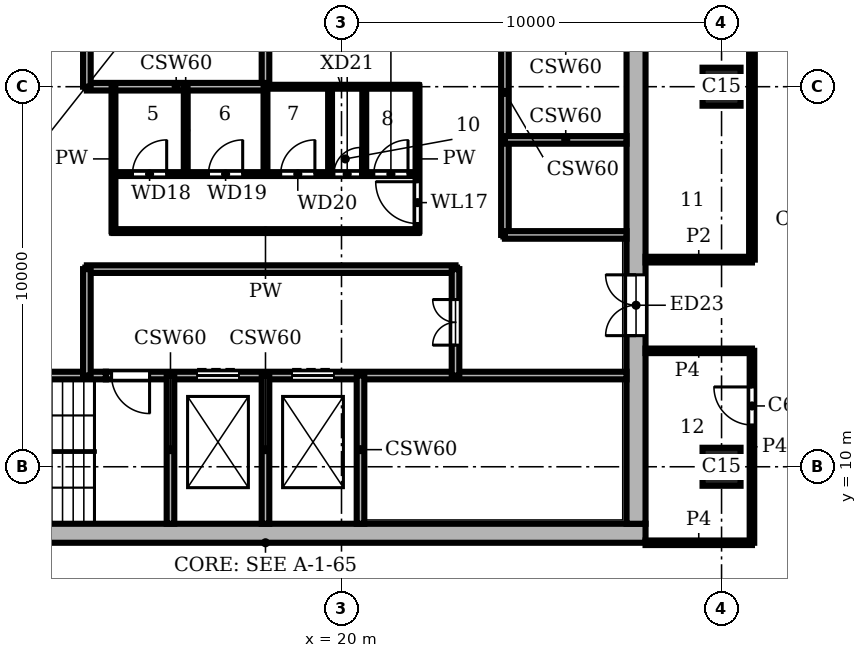
"""IFC4 building model, lengths in metres.
Left out: names, types, materials, properties, quantities, classifications, styles, units other than length and angle.
Written with IfcOpenShell. Run it as: python <this file> out.ifc"""

import sys

from ifc_helpers import new_model, si_unit, direction, frame, frame_2d, origin, origin_2d, place, context, subcontext, project, spatial, rectangle, extrude, element, fill, save


model = new_model("IFC4")
c1 = context("Model", 3, precision=1e-05, world=origin(), true_north=direction((0.0, 1.0)))
c2 = subcontext(c1, "Body", "Model", "MODEL_VIEW")
j1 = project(units=[si_unit("LENGTHUNIT", "METRE"), si_unit("PLANEANGLEUNIT", "RADIAN")], contexts=[c1])
p1 = place(None, origin())
s1 = spatial("IfcSite", under=j1, at=p1, CompositionType="ELEMENT")
p2 = place(p1, origin())
s2 = spatial("IfcBuilding", under=s1, at=p2, CompositionType="ELEMENT")
p3 = place(p2, frame((0.0, 0.0, 294.3)))
s3 = spatial("IfcBuildingStorey", under=s2, at=p3, CompositionType="ELEMENT", Elevation=294.3)
for number, where, z_axis, x_axis in (
    (1, (30.0, 10.0, 0.0), (0.0, 0.0, 1.0), (1.0, 0.0, 0.0)),
    (2, (30.0, 20.0, 0.0), (0.0, 0.0, 1.0), (1.0, 0.0, 0.0)),
):
    element("IfcColumn", number, at=place(p3, frame(where, z_axis=z_axis, x_axis=x_axis)), inside=s3, PredefinedType="COLUMN", context=c2, shape_type="SweptSolid", body=[
        extrude(rectangle(XDim=1.0, YDim=1.0, at=origin_2d()), origin(), (0.0, 0.0, 1.0), 3.9),
    ])
p4 = place(p3, frame((8.0, 8.25, 0.0), z_axis=(0.0, 0.0, 1.0), x_axis=(1.0, 0.0, 0.0)))
e3 = element("IfcWall", 3, at=p4, inside=s3, PredefinedType="SHEAR", context=c2, shape_type="SweptSolid", body=[
    extrude(rectangle(XDim=20.0, YDim=0.5, at=frame_2d((10.0, 0.0))), origin(), (0.0, 0.0, 1.0), 3.9),
])
p5 = place(p3, frame((27.75, 8.5, 0.0), z_axis=(0.0, 0.0, 1.0), x_axis=(0.0, 1.0, 0.0)))
e4 = element("IfcWall", 4, at=p5, inside=s3, PredefinedType="SHEAR", context=c2, shape_type="SweptSolid", body=[
    extrude(rectangle(XDim=19.0, YDim=0.5, at=frame_2d((9.5, 0.0))), origin(), (0.0, 0.0, 1.0), 3.9),
])
p6 = place(p5, frame((4.95, 0.0, 0.0)))
e5 = element("IfcOpeningElement", 5, at=p6, cuts=e4, PredefinedType="OPENING", context=c2, shape_type="SweptSolid", body=[
    extrude(rectangle(XDim=1.6, YDim=2.1, at=frame_2d((0.8, 1.05))), frame((0.0, 0.26, 0.0), z_axis=(0.0, -1.0, 0.0), x_axis=(1.0, 0.0, 0.0)), (0.0, 0.0, 1.0), 0.52),
])
p7 = place(p3, frame((8.5, 12.4, 0.0), z_axis=(0.0, 0.0, 1.0), x_axis=(1.0, 0.0, 0.0)))
e6 = element("IfcWall", 6, at=p7, inside=s3, PredefinedType="SHEAR", context=c2, shape_type="SweptSolid", body=[
    extrude(rectangle(XDim=5.3, YDim=0.2, at=frame_2d((2.65, 0.0))), origin(), (0.0, 0.0, 1.0), 3.58),
])
p8 = place(p3, frame((13.8, 12.4, 0.0), z_axis=(0.0, 0.0, 1.0), x_axis=(1.0, 0.0, 0.0)))
e7 = element("IfcWall", 7, at=p8, inside=s3, PredefinedType="SHEAR", context=c2, shape_type="SweptSolid", body=[
    extrude(rectangle(XDim=13.7, YDim=0.2, at=frame_2d((6.85, 0.0))), origin(), (0.0, 0.0, 1.0), 3.58),
])
p9 = place(p8, frame((2.4, 0.0, 0.0)))
e8 = element("IfcOpeningElement", 8, at=p9, cuts=e7, PredefinedType="OPENING", context=c2, shape_type="SweptSolid", body=[
    extrude(rectangle(XDim=1.1, YDim=2.1, at=frame_2d((0.55, 1.05))), frame((0.0, 0.11, 0.0), z_axis=(0.0, -1.0, 0.0), x_axis=(1.0, 0.0, 0.0)), (0.0, 0.0, 1.0), 0.22),
])
p10 = place(p8, frame((4.9, 0.0, 0.0)))
e9 = element("IfcOpeningElement", 9, at=p10, cuts=e7, PredefinedType="OPENING", context=c2, shape_type="SweptSolid", body=[
    extrude(rectangle(XDim=1.1, YDim=2.1, at=frame_2d((0.55, 1.05))), frame((0.0, 0.11, 0.0), z_axis=(0.0, -1.0, 0.0), x_axis=(1.0, 0.0, 0.0)), (0.0, 0.0, 1.0), 0.22),
])
p11 = place(p8, frame((0.15, 0.0, 0.0)))
e10 = element("IfcOpeningElement", 10, at=p11, cuts=e7, PredefinedType="OPENING", context=c2, shape_type="SweptSolid", body=[
    extrude(rectangle(XDim=1.0, YDim=2.1, at=frame_2d((0.5, 1.05))), frame((0.0, 0.11, 0.0), z_axis=(0.0, -1.0, 0.0), x_axis=(1.0, 0.0, 0.0)), (0.0, 0.0, 1.0), 0.22),
])
p12 = place(p3, frame((13.3, 15.2, 0.0), z_axis=(0.0, 0.0, 1.0), x_axis=(1.0, 0.0, 0.0)))
e11 = element("IfcWall", 11, at=p12, inside=s3, PredefinedType="SHEAR", context=c2, shape_type="SweptSolid", body=[
    extrude(rectangle(XDim=9.7, YDim=0.2, at=frame_2d((4.85, 0.0))), origin(), (0.0, 0.0, 1.0), 3.58),
])
p13 = place(p3, frame((24.3, 16.1, 0.0), z_axis=(0.0, 0.0, 1.0), x_axis=(1.0, 0.0, 0.0)))
e12 = element("IfcWall", 12, at=p13, inside=s3, PredefinedType="SHEAR", context=c2, shape_type="SweptSolid", body=[
    extrude(rectangle(XDim=3.2, YDim=0.2, at=frame_2d((1.6, 0.0))), origin(), (0.0, 0.0, 1.0), 3.58),
])
p14 = place(p3, frame((14.0, 16.2, 0.0), z_axis=(0.0, 0.0, 1.0), x_axis=(1.0, 0.0, 0.0)))
e13 = element("IfcWall", 13, at=p14, inside=s3, PredefinedType="PARTITIONING", context=c2, shape_type="SweptSolid", body=[
    extrude(rectangle(XDim=8.0, YDim=0.1, at=frame_2d((4.0, 0.0))), origin(), (0.0, 0.0, 1.0), 3.58),
])
p15 = place(p3, frame((14.0, 17.7, 0.0), z_axis=(0.0, 0.0, 1.0), x_axis=(1.0, 0.0, 0.0)))
e14 = element("IfcWall", 14, at=p15, inside=s3, PredefinedType="PARTITIONING", context=c2, shape_type="SweptSolid", body=[
    extrude(rectangle(XDim=8.0, YDim=0.1, at=frame_2d((4.0, 0.0))), origin(), (0.0, 0.0, 1.0), 3.58),
])
p16 = place(p15, frame((0.5, 0.0, 0.0)))
e15 = element("IfcOpeningElement", 15, at=p16, cuts=e14, PredefinedType="OPENING", context=c2, shape_type="SweptSolid", body=[
    extrude(rectangle(XDim=0.9, YDim=2.1, at=frame_2d((0.45, 1.05))), frame((0.0, 0.06, 0.0), z_axis=(0.0, -1.0, 0.0), x_axis=(1.0, 0.0, 0.0)), (0.0, 0.0, 1.0), 0.12),
])
p17 = place(p15, frame((2.5, 0.0, 0.0)))
e16 = element("IfcOpeningElement", 16, at=p17, cuts=e14, PredefinedType="OPENING", context=c2, shape_type="SweptSolid", body=[
    extrude(rectangle(XDim=0.9, YDim=2.1, at=frame_2d((0.45, 1.05))), frame((0.0, 0.06, 0.0), z_axis=(0.0, -1.0, 0.0), x_axis=(1.0, 0.0, 0.0)), (0.0, 0.0, 1.0), 0.12),
])
p18 = place(p15, frame((4.4, 0.0, 0.0)))
e17 = element("IfcOpeningElement", 17, at=p18, cuts=e14, PredefinedType="OPENING", context=c2, shape_type="SweptSolid", body=[
    extrude(rectangle(XDim=0.9, YDim=2.1, at=frame_2d((0.45, 1.05))), frame((0.0, 0.06, 0.0), z_axis=(0.0, -1.0, 0.0), x_axis=(1.0, 0.0, 0.0)), (0.0, 0.0, 1.0), 0.12),
])
p19 = place(p15, frame((5.8, 0.0, 0.0)))
e18 = element("IfcOpeningElement", 18, at=p19, cuts=e14, PredefinedType="OPENING", context=c2, shape_type="SweptSolid", body=[
    extrude(rectangle(XDim=0.7, YDim=2.1, at=frame_2d((0.35, 1.05))), frame((0.0, 0.06, 0.0), z_axis=(0.0, -1.0, 0.0), x_axis=(1.0, 0.0, 0.0)), (0.0, 0.0, 1.0), 0.12),
])
p20 = place(p15, frame((6.85, 0.0, 0.0)))
e19 = element("IfcOpeningElement", 19, at=p20, cuts=e14, PredefinedType="OPENING", context=c2, shape_type="SweptSolid", body=[
    extrude(rectangle(XDim=0.9, YDim=2.1, at=frame_2d((0.45, 1.05))), frame((0.0, 0.06, 0.0), z_axis=(0.0, -1.0, 0.0), x_axis=(1.0, 0.0, 0.0)), (0.0, 0.0, 1.0), 0.12),
])
p21 = place(p3, frame((24.3, 18.6, 0.0), z_axis=(0.0, 0.0, 1.0), x_axis=(1.0, 0.0, 0.0)))
e20 = element("IfcWall", 20, at=p21, inside=s3, PredefinedType="SHEAR", context=c2, shape_type="SweptSolid", body=[
    extrude(rectangle(XDim=3.2, YDim=0.2, at=frame_2d((1.6, 0.0))), origin(), (0.0, 0.0, 1.0), 3.58),
])
p22 = place(p3, frame((18.0, 20.0, 0.0), z_axis=(0.0, 0.0, 1.0), x_axis=(1.0, 0.0, 0.0)))
e21 = element("IfcWall", 21, at=p22, inside=s3, PredefinedType="PARTITIONING", context=c2, shape_type="SweptSolid", body=[
    extrude(rectangle(XDim=4.0, YDim=0.1, at=frame_2d((2.0, 0.0))), origin(), (0.0, 0.0, 1.0), 3.58),
])
p23 = place(p3, frame((13.3, 20.0, 0.0), z_axis=(0.0, 0.0, 1.0), x_axis=(1.0, 0.0, 0.0)))
e22 = element("IfcWall", 22, at=p23, inside=s3, PredefinedType="SHEAR", context=c2, shape_type="SweptSolid", body=[
    extrude(rectangle(XDim=4.7, YDim=0.2, at=frame_2d((2.35, 0.0))), origin(), (0.0, 0.0, 1.0), 3.58),
])
p24 = place(p3, frame((13.3, 12.4, 0.0), z_axis=(0.0, 0.0, 1.0), x_axis=(0.0, 1.0, 0.0)))
e23 = element("IfcWall", 23, at=p24, inside=s3, PredefinedType="SHEAR", context=c2, shape_type="SweptSolid", body=[
    extrude(rectangle(XDim=2.8, YDim=0.2, at=frame_2d((1.4, 0.0))), origin(), (0.0, 0.0, 1.0), 3.58),
])
p25 = place(p3, frame((13.3, 20.0, 0.0), z_axis=(0.0, 0.0, 1.0), x_axis=(0.0, 1.0, 0.0)))
e24 = element("IfcWall", 24, at=p25, inside=s3, PredefinedType="SHEAR", context=c2, shape_type="SweptSolid", body=[
    extrude(rectangle(XDim=3.6, YDim=0.2, at=frame_2d((1.8, 0.0))), origin(), (0.0, 0.0, 1.0), 3.58),
])
p26 = place(p3, frame((14.0, 16.2, 0.0), z_axis=(0.0, 0.0, 1.0), x_axis=(0.0, 1.0, 0.0)))
e25 = element("IfcWall", 25, at=p26, inside=s3, PredefinedType="PARTITIONING", context=c2, shape_type="SweptSolid", body=[
    extrude(rectangle(XDim=3.8, YDim=0.1, at=frame_2d((1.9, 0.0))), origin(), (0.0, 0.0, 1.0), 3.58),
])
p27 = place(p3, frame((15.5, 8.5, 0.0), z_axis=(0.0, 0.0, 1.0), x_axis=(0.0, 1.0, 0.0)))
e26 = element("IfcWall", 26, at=p27, inside=s3, PredefinedType="SHEAR", context=c2, shape_type="SweptSolid", body=[
    extrude(rectangle(XDim=3.9, YDim=0.2, at=frame_2d((1.95, 0.0))), origin(), (0.0, 0.0, 1.0), 3.58),
])
for number, where, z_axis, x_axis in (
    (27, (15.9, 17.7, 0.0), (0.0, 0.0, 1.0), (0.0, 1.0, 0.0)),
    (28, (18.0, 17.7, 0.0), (0.0, 0.0, 1.0), (0.0, 1.0, 0.0)),
):
    element("IfcWall", number, at=place(p3, frame(where, z_axis=z_axis, x_axis=x_axis)), inside=s3, PredefinedType="PARTITIONING", context=c2, shape_type="SweptSolid", body=[
        extrude(rectangle(XDim=2.3, YDim=0.1, at=frame_2d((1.15, 0.0))), origin(), (0.0, 0.0, 1.0), 3.58),
    ])
p28 = place(p3, frame((18.0, 8.5, 0.0), z_axis=(0.0, 0.0, 1.0), x_axis=(0.0, 1.0, 0.0)))
e29 = element("IfcWall", 29, at=p28, inside=s3, PredefinedType="SHEAR", context=c2, shape_type="SweptSolid", body=[
    extrude(rectangle(XDim=3.9, YDim=0.2, at=frame_2d((1.95, 0.0))), origin(), (0.0, 0.0, 1.0), 3.58),
])
p29 = place(p3, frame((18.0, 20.0, 0.0), z_axis=(0.0, 0.0, 1.0), x_axis=(0.0, 1.0, 0.0)))
e30 = element("IfcWall", 30, at=p29, inside=s3, PredefinedType="SHEAR", context=c2, shape_type="SweptSolid", body=[
    extrude(rectangle(XDim=7.5, YDim=0.2, at=frame_2d((3.75, 0.0))), origin(), (0.0, 0.0, 1.0), 3.58),
])
p30 = place(p29, frame((1.2, 0.0, 0.0)))
e31 = element("IfcOpeningElement", 31, at=p30, cuts=e30, PredefinedType="OPENING", context=c2, shape_type="SweptSolid", body=[
    extrude(rectangle(XDim=1.2, YDim=2.1, at=frame_2d((0.6, 1.05))), frame((0.0, 0.11, 0.0), z_axis=(0.0, -1.0, 0.0), x_axis=(1.0, 0.0, 0.0)), (0.0, 0.0, 1.0), 0.22),
])
p31 = place(p3, frame((19.7, 17.7, 0.0), z_axis=(0.0, 0.0, 1.0), x_axis=(0.0, 1.0, 0.0)))
e32 = element("IfcWall", 32, at=p31, inside=s3, PredefinedType="PARTITIONING", context=c2, shape_type="SweptSolid", body=[
    extrude(rectangle(XDim=2.3, YDim=0.1, at=frame_2d((1.15, 0.0))), origin(), (0.0, 0.0, 1.0), 3.58),
])
p32 = place(p3, frame((20.5, 8.5, 0.0), z_axis=(0.0, 0.0, 1.0), x_axis=(0.0, 1.0, 0.0)))
e33 = element("IfcWall", 33, at=p32, inside=s3, PredefinedType="SHEAR", context=c2, shape_type="SweptSolid", body=[
    extrude(rectangle(XDim=3.9, YDim=0.2, at=frame_2d((1.95, 0.0))), origin(), (0.0, 0.0, 1.0), 3.58),
])
p33 = place(p3, frame((20.6, 17.7, 0.0), z_axis=(0.0, 0.0, 1.0), x_axis=(0.0, 1.0, 0.0)))
e34 = element("IfcWall", 34, at=p33, inside=s3, PredefinedType="PARTITIONING", context=c2, shape_type="SweptSolid", body=[
    extrude(rectangle(XDim=2.3, YDim=0.1, at=frame_2d((1.15, 0.0))), origin(), (0.0, 0.0, 1.0), 3.58),
])
p34 = place(p3, frame((22.0, 16.2, 0.0), z_axis=(0.0, 0.0, 1.0), x_axis=(0.0, 1.0, 0.0)))
e35 = element("IfcWall", 35, at=p34, inside=s3, PredefinedType="PARTITIONING", context=c2, shape_type="SweptSolid", body=[
    extrude(rectangle(XDim=3.8, YDim=0.1, at=frame_2d((1.9, 0.0))), origin(), (0.0, 0.0, 1.0), 3.58),
])
p35 = place(p34, frame((0.2, 0.0, 0.0)))
e36 = element("IfcOpeningElement", 36, at=p35, cuts=e35, PredefinedType="OPENING", context=c2, shape_type="SweptSolid", body=[
    extrude(rectangle(XDim=1.1, YDim=2.1, at=frame_2d((0.55, 1.05))), frame((0.0, 0.06, 0.0), z_axis=(0.0, -1.0, 0.0), x_axis=(1.0, 0.0, 0.0)), (0.0, 0.0, 1.0), 0.12),
])
p36 = place(p3, frame((23.0, 12.4, 0.0), z_axis=(0.0, 0.0, 1.0), x_axis=(0.0, 1.0, 0.0)))
e37 = element("IfcWall", 37, at=p36, inside=s3, PredefinedType="SHEAR", context=c2, shape_type="SweptSolid", body=[
    extrude(rectangle(XDim=2.8, YDim=0.2, at=frame_2d((1.4, 0.0))), origin(), (0.0, 0.0, 1.0), 3.58),
])
p37 = place(p36, frame((0.8, 0.0, 0.0)))
e38 = element("IfcOpeningElement", 38, at=p37, cuts=e37, PredefinedType="OPENING", context=c2, shape_type="SweptSolid", body=[
    extrude(rectangle(XDim=1.2, YDim=2.1, at=frame_2d((0.6, 1.05))), frame((0.0, 0.11, 0.0), z_axis=(0.0, -1.0, 0.0), x_axis=(1.0, 0.0, 0.0)), (0.0, 0.0, 1.0), 0.22),
])
p38 = place(p3, frame((24.3, 16.1, 0.0), z_axis=(0.0, 0.0, 1.0), x_axis=(0.0, 1.0, 0.0)))
e39 = element("IfcWall", 39, at=p38, inside=s3, PredefinedType="SHEAR", context=c2, shape_type="SweptSolid", body=[
    extrude(rectangle(XDim=7.5, YDim=0.2, at=frame_2d((3.75, 0.0))), origin(), (0.0, 0.0, 1.0), 3.58),
])
p39 = place(p38, frame((5.7, 0.0, 0.0)))
e40 = element("IfcOpeningElement", 40, at=p39, cuts=e39, PredefinedType="OPENING", context=c2, shape_type="SweptSolid", body=[
    extrude(rectangle(XDim=1.1, YDim=2.1, at=frame_2d((0.55, 1.05))), frame((0.0, 0.11, 0.0), z_axis=(0.0, -1.0, 0.0), x_axis=(1.0, 0.0, 0.0)), (0.0, 0.0, 1.0), 0.22),
])
p40 = place(p3, frame((30.8, 15.45, 0.0), z_axis=(0.0, 0.0, 1.0), x_axis=(0.0, 1.0, 0.0)))
e41 = element("IfcWall", 41, at=p40, inside=s3, PredefinedType="PARTITIONING", context=c2, shape_type="SweptSolid", body=[
    extrude(rectangle(XDim=15.15, YDim=0.15, at=frame_2d((7.575, 0.0))), origin(), (0.0, 0.0, 1.0), 3.58),
])
p41 = place(p40, frame((5.85, 0.0, 0.0)))
e42 = element("IfcOpeningElement", 42, at=p41, cuts=e41, PredefinedType="OPENING", context=c2, shape_type="SweptSolid", body=[
    extrude(rectangle(XDim=1.0, YDim=2.1, at=frame_2d((0.5, 1.05))), frame((0.0, 0.085, 0.0), z_axis=(0.0, -1.0, 0.0), x_axis=(1.0, 0.0, 0.0)), (0.0, 0.0, 1.0), 0.17),
])
p42 = place(p40, frame((11.35, 0.0, 0.0)))
e43 = element("IfcOpeningElement", 43, at=p42, cuts=e41, PredefinedType="OPENING", context=c2, shape_type="SweptSolid", body=[
    extrude(rectangle(XDim=1.0, YDim=2.1, at=frame_2d((0.5, 1.05))), frame((0.0, 0.085, 0.0), z_axis=(0.0, -1.0, 0.0), x_axis=(1.0, 0.0, 0.0)), (0.0, 0.0, 1.0), 0.17),
])
p43 = place(p3, frame((28.0, 15.45, 0.0), z_axis=(0.0, 0.0, 1.0), x_axis=(1.0, 0.0, 0.0)))
e44 = element("IfcWall", 44, at=p43, inside=s3, PredefinedType="PARTITIONING", context=c2, shape_type="SweptSolid", body=[
    extrude(rectangle(XDim=2.8, YDim=0.15, at=frame_2d((1.4, 0.0))), origin(), (0.0, 0.0, 1.0), 3.58),
])
p44 = place(p3, frame((30.8, 8.0, 0.0), z_axis=(0.0, 0.0, 1.0), x_axis=(0.0, 1.0, 0.0)))
e45 = element("IfcWall", 45, at=p44, inside=s3, PredefinedType="PARTITIONING", context=c2, shape_type="SweptSolid", body=[
    extrude(rectangle(XDim=5.05, YDim=0.12, at=frame_2d((2.525, 0.0))), origin(), (0.0, 0.0, 1.0), 3.58),
])
p45 = place(p44, frame((3.1, 0.0, 0.0)))
e46 = element("IfcOpeningElement", 46, at=p45, cuts=e45, PredefinedType="OPENING", context=c2, shape_type="SweptSolid", body=[
    extrude(rectangle(XDim=1.0, YDim=2.1, at=frame_2d((0.5, 1.05))), frame((0.0, 0.07, 0.0), z_axis=(0.0, -1.0, 0.0), x_axis=(1.0, 0.0, 0.0)), (0.0, 0.0, 1.0), 0.14),
])
for number, where, z_axis, x_axis in (
    (47, (28.0, 8.0, 0.0), (0.0, 0.0, 1.0), (1.0, 0.0, 0.0)),
    (48, (28.0, 13.05, 0.0), (0.0, 0.0, 1.0), (1.0, 0.0, 0.0)),
):
    element("IfcWall", number, at=place(p3, frame(where, z_axis=z_axis, x_axis=x_axis)), inside=s3, PredefinedType="PARTITIONING", context=c2, shape_type="SweptSolid", body=[
        extrude(rectangle(XDim=2.8, YDim=0.12, at=frame_2d((1.4, 0.0))), origin(), (0.0, 0.0, 1.0), 3.58),
    ])
p46 = place(p9, origin())
e49 = element("IfcDoor", 49, at=p46, inside=s3, OperationType="DOUBLE_DOOR_SLIDING", PredefinedType="DOOR", context=c2, shape_type="SweptSolid", body=[
    extrude(rectangle(XDim=1.1, YDim=2.1, at=frame_2d((0.55, 1.05))), frame((0.0, 0.025, 0.0), z_axis=(0.0, -1.0, 0.0), x_axis=(1.0, 0.0, 0.0)), (0.0, 0.0, 1.0), 0.05),
])
fill(e8, e49)
p47 = place(p10, origin())
e50 = element("IfcDoor", 50, at=p47, inside=s3, OperationType="DOUBLE_DOOR_SLIDING", PredefinedType="DOOR", context=c2, shape_type="SweptSolid", body=[
    extrude(rectangle(XDim=1.1, YDim=2.1, at=frame_2d((0.55, 1.05))), frame((0.0, 0.025, 0.0), z_axis=(0.0, -1.0, 0.0), x_axis=(1.0, 0.0, 0.0)), (0.0, 0.0, 1.0), 0.05),
])
fill(e9, e50)
p48 = place(p11, frame((1.0, 0.0, 0.0), z_axis=(0.0, 0.0, 1.0), x_axis=(-1.0, 0.0, 0.0)))
e51 = element("IfcDoor", 51, at=p48, inside=s3, OperationType="SINGLE_SWING_LEFT", PredefinedType="DOOR", context=c2, shape_type="SweptSolid", body=[
    extrude(rectangle(XDim=1.0, YDim=2.1, at=frame_2d((0.5, 1.05))), frame((0.0, 0.025, 0.0), z_axis=(0.0, -1.0, 0.0), x_axis=(1.0, 0.0, 0.0)), (0.0, 0.0, 1.0), 0.05),
])
fill(e10, e51)
p49 = place(p37, origin())
e52 = element("IfcDoor", 52, at=p49, inside=s3, OperationType="DOUBLE_DOOR_SINGLE_SWING", PredefinedType="DOOR", context=c2, shape_type="SweptSolid", body=[
    extrude(rectangle(XDim=1.2, YDim=2.1, at=frame_2d((0.6, 1.05))), frame((0.0, 0.025, 0.0), z_axis=(0.0, -1.0, 0.0), x_axis=(1.0, 0.0, 0.0)), (0.0, 0.0, 1.0), 0.05),
])
fill(e38, e52)
p50 = place(p35, origin())
e53 = element("IfcDoor", 53, at=p50, inside=s3, OperationType="SINGLE_SWING_RIGHT", PredefinedType="DOOR", context=c2, shape_type="SweptSolid", body=[
    extrude(rectangle(XDim=1.1, YDim=2.1, at=frame_2d((0.55, 1.05))), frame((0.0, 0.025, 0.0), z_axis=(0.0, -1.0, 0.0), x_axis=(1.0, 0.0, 0.0)), (0.0, 0.0, 1.0), 0.05),
])
fill(e36, e53)
p51 = place(p16, origin())
e54 = element("IfcDoor", 54, at=p51, inside=s3, OperationType="SINGLE_SWING_RIGHT", PredefinedType="DOOR", context=c2, shape_type="SweptSolid", body=[
    extrude(rectangle(XDim=0.9, YDim=2.1, at=frame_2d((0.45, 1.05))), frame((0.0, 0.025, 0.0), z_axis=(0.0, -1.0, 0.0), x_axis=(1.0, 0.0, 0.0)), (0.0, 0.0, 1.0), 0.05),
])
fill(e15, e54)
p52 = place(p17, origin())
e55 = element("IfcDoor", 55, at=p52, inside=s3, OperationType="SINGLE_SWING_RIGHT", PredefinedType="DOOR", context=c2, shape_type="SweptSolid", body=[
    extrude(rectangle(XDim=0.9, YDim=2.1, at=frame_2d((0.45, 1.05))), frame((0.0, 0.025, 0.0), z_axis=(0.0, -1.0, 0.0), x_axis=(1.0, 0.0, 0.0)), (0.0, 0.0, 1.0), 0.05),
])
fill(e16, e55)
p53 = place(p18, origin())
e56 = element("IfcDoor", 56, at=p53, inside=s3, OperationType="SINGLE_SWING_RIGHT", PredefinedType="DOOR", context=c2, shape_type="SweptSolid", body=[
    extrude(rectangle(XDim=0.9, YDim=2.1, at=frame_2d((0.45, 1.05))), frame((0.0, 0.025, 0.0), z_axis=(0.0, -1.0, 0.0), x_axis=(1.0, 0.0, 0.0)), (0.0, 0.0, 1.0), 0.05),
])
fill(e17, e56)
p54 = place(p19, origin())
e57 = element("IfcDoor", 57, at=p54, inside=s3, OperationType="SINGLE_SWING_RIGHT", PredefinedType="DOOR", context=c2, shape_type="SweptSolid", body=[
    extrude(rectangle(XDim=0.7, YDim=2.1, at=frame_2d((0.35, 1.05))), frame((0.0, 0.025, 0.0), z_axis=(0.0, -1.0, 0.0), x_axis=(1.0, 0.0, 0.0)), (0.0, 0.0, 1.0), 0.05),
])
fill(e18, e57)
p55 = place(p20, origin())
e58 = element("IfcDoor", 58, at=p55, inside=s3, OperationType="SINGLE_SWING_RIGHT", PredefinedType="DOOR", context=c2, shape_type="SweptSolid", body=[
    extrude(rectangle(XDim=0.9, YDim=2.1, at=frame_2d((0.45, 1.05))), frame((0.0, 0.025, 0.0), z_axis=(0.0, -1.0, 0.0), x_axis=(1.0, 0.0, 0.0)), (0.0, 0.0, 1.0), 0.05),
])
fill(e19, e58)
p56 = place(p6, origin())
e59 = element("IfcDoor", 59, at=p56, inside=s3, OperationType="DOUBLE_DOOR_SINGLE_SWING", PredefinedType="DOOR", context=c2, shape_type="SweptSolid", body=[
    extrude(rectangle(XDim=1.6, YDim=2.1, at=frame_2d((0.8, 1.05))), frame((0.0, 0.025, 0.0), z_axis=(0.0, -1.0, 0.0), x_axis=(1.0, 0.0, 0.0)), (0.0, 0.0, 1.0), 0.05),
])
fill(e5, e59)
p57 = place(p45, origin())
e60 = element("IfcDoor", 60, at=p57, inside=s3, OperationType="SINGLE_SWING_RIGHT", PredefinedType="DOOR", context=c2, shape_type="SweptSolid", body=[
    extrude(rectangle(XDim=1.0, YDim=2.1, at=frame_2d((0.5, 1.05))), frame((0.0, 0.025, 0.0), z_axis=(0.0, -1.0, 0.0), x_axis=(1.0, 0.0, 0.0)), (0.0, 0.0, 1.0), 0.05),
])
fill(e46, e60)
save(model, sys.argv[1])
